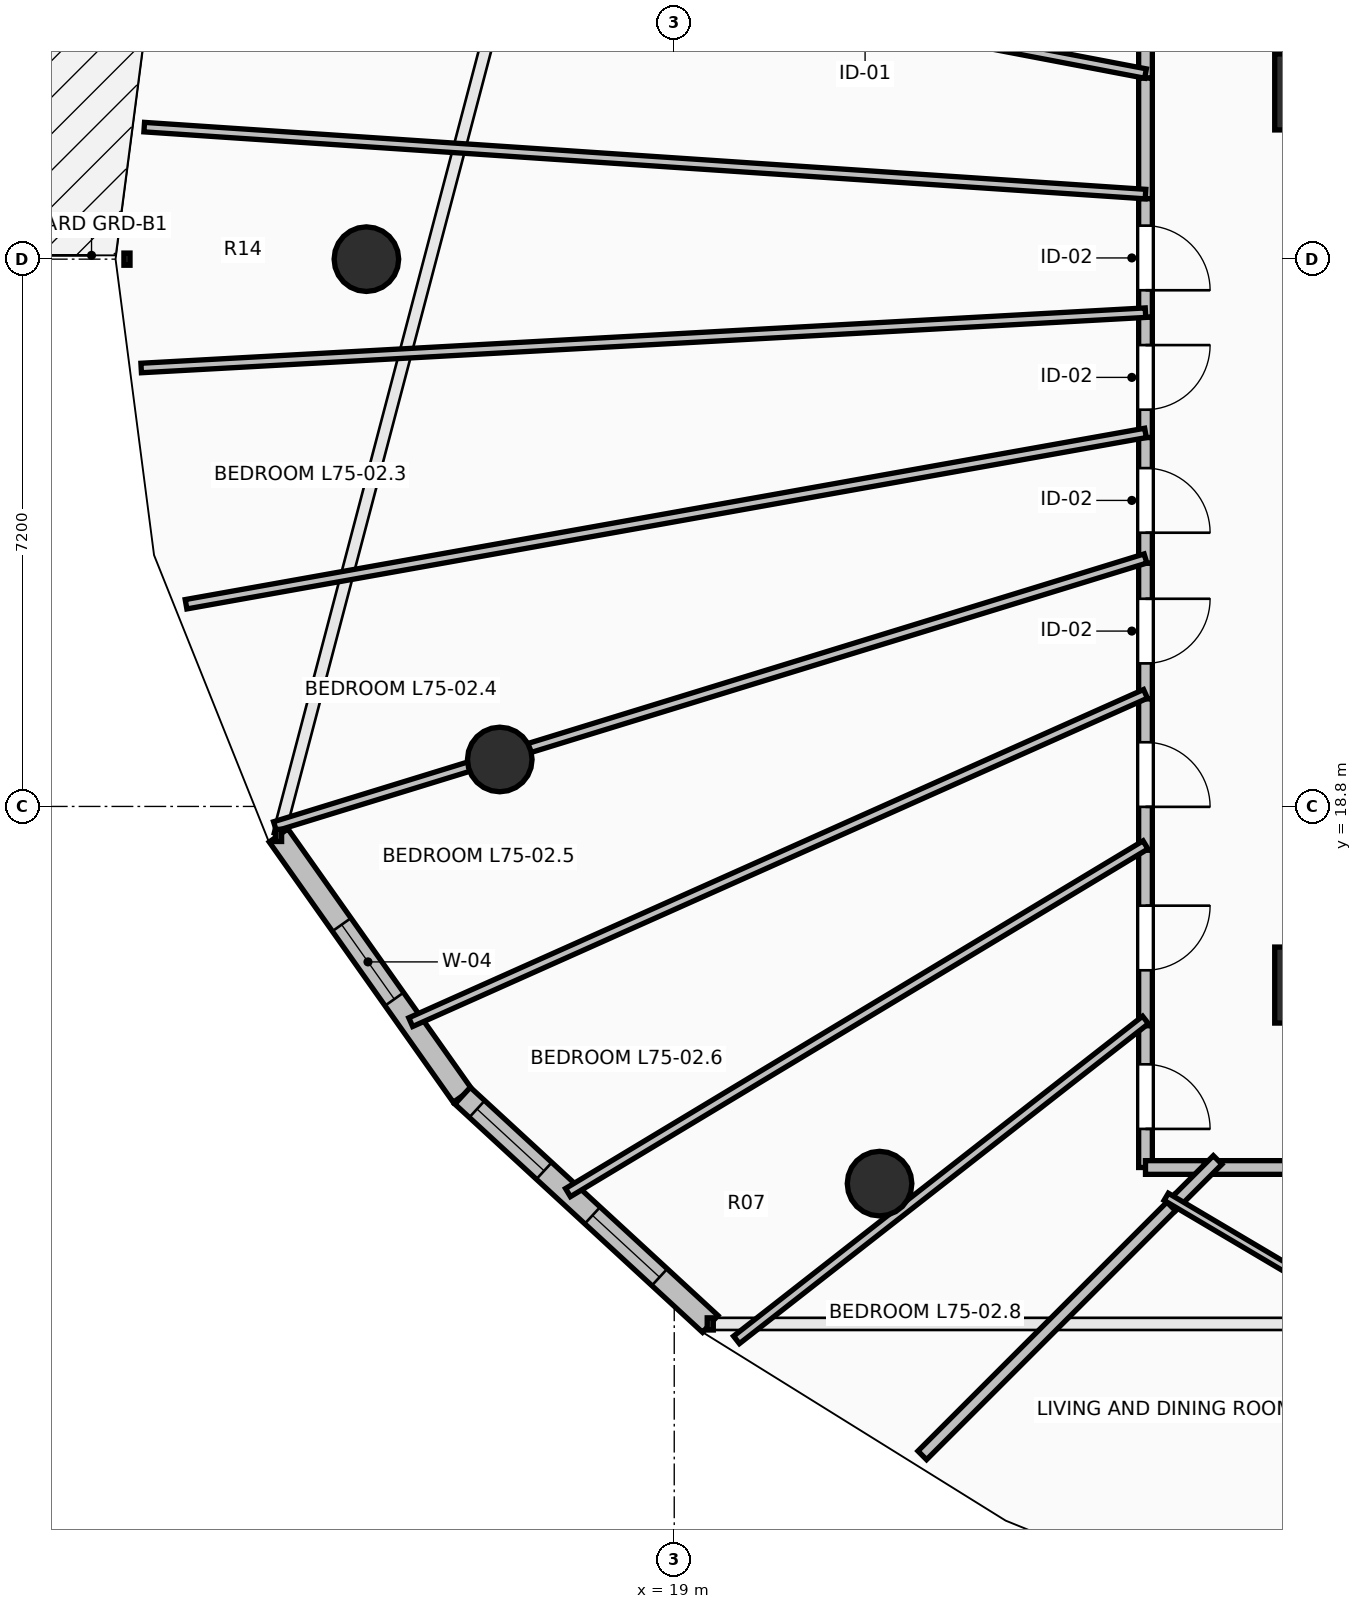
"""IFC4 building model, lengths in metres.
Left out: names, types, materials, properties, quantities, classifications, styles, units other than length and angle.
Written with IfcOpenShell. Run it as: python <this file> out.ifc"""

import sys

from ifc_helpers import new_model, si_unit, direction, frame, frame_2d, origin, origin_2d, place, context, subcontext, project, spatial, rectangle, circle, extrude, element, fill, save


model = new_model("IFC4")
c1 = context("Model", 3, precision=1e-05, world=origin(), true_north=direction((0.0, 1.0)))
c2 = subcontext(c1, "Body", "Model", "MODEL_VIEW")
j1 = project(units=[si_unit("LENGTHUNIT", "METRE"), si_unit("PLANEANGLEUNIT", "RADIAN")], contexts=[c1])
p1 = place(None, origin())
s1 = spatial("IfcSite", under=j1, at=p1, CompositionType="ELEMENT")
p2 = place(p1, origin())
s2 = spatial("IfcBuilding", under=s1, at=p2, CompositionType="ELEMENT")
p3 = place(p2, frame((0.0, 0.0, 276.85)))
s3 = spatial("IfcBuildingStorey", under=s2, at=p3, CompositionType="ELEMENT", Elevation=276.85)
for number, where, z_axis, x_axis in (
    (1, (14.95, 26.0, 0.0), (0.0, 0.0, 1.0), (-1.0, 0.0, 0.0)),
    (2, (16.705, 19.418, 0.0), (0.0, 0.0, 1.0), (-0.924, -0.383, 0.0)),
    (3, (21.701, 13.838, 0.0), (0.0, 0.0, 1.0), (-0.707, -0.707, 0.0)),
):
    element("IfcColumn", number, at=place(p3, frame(where, z_axis=z_axis, x_axis=x_axis)), inside=s3, PredefinedType="COLUMN", context=c2, shape_type="SweptSolid", body=[
        extrude(circle(Radius=0.425, at=origin_2d()), origin(), (0.0, 0.0, 1.0), 3.55),
    ])
for number, where, z_axis, x_axis in (
    (4, (27.25, 16.45, 0.0), (0.0, 0.0, 1.0), (1.0, 0.0, 0.0)),
    (5, (27.25, 28.2, 0.0), (0.0, 0.0, 1.0), (1.0, 0.0, 0.0)),
):
    element("IfcColumn", number, at=place(p3, frame(where, z_axis=z_axis, x_axis=x_axis)), inside=s3, PredefinedType="PILASTER", context=c2, shape_type="SweptSolid", body=[
        extrude(rectangle(XDim=0.7, YDim=1.0, at=origin_2d()), origin(), (0.0, 0.0, 1.0), 3.55),
    ])
p4 = place(p3, frame((13.794, 18.419, 0.0), z_axis=(0.0, 0.0, 1.0), x_axis=(0.577261247247, -0.816559521668, 0.0)))
e6 = element("IfcWall", 6, at=p4, inside=s3, PredefinedType="STANDARD", context=c2, shape_type="SweptSolid", body=[
    extrude(rectangle(XDim=4.194, YDim=0.3, at=frame_2d((2.097, 0.0))), origin(), (0.0, 0.0, 1.0), 3.19),
])
p5 = place(p4, frame((1.438, 0.0, 0.85)))
e7 = element("IfcOpeningElement", 7, at=p5, cuts=e6, PredefinedType="OPENING", context=c2, shape_type="SweptSolid", body=[
    extrude(rectangle(XDim=1.2, YDim=1.95, at=frame_2d((0.6, 0.975))), frame((0.0, 0.165, 0.0), z_axis=(0.0, -1.0, 0.0), x_axis=(1.0, 0.0, 0.0)), (0.0, 0.0, 1.0), 0.33),
])
p6 = place(p3, frame((16.216, 14.994, 0.0), z_axis=(0.0, 0.0, 1.0), x_axis=(0.735445373611, -0.677584018727, 0.0)))
e8 = element("IfcWall", 8, at=p6, inside=s3, PredefinedType="STANDARD", context=c2, shape_type="SweptSolid", body=[
    extrude(rectangle(XDim=4.43, YDim=0.3, at=frame_2d((2.215, 0.0))), origin(), (0.0, 0.0, 1.0), 3.19),
])
p7 = place(p6, frame((0.258, 0.0, 0.85)))
e9 = element("IfcOpeningElement", 9, at=p7, cuts=e8, PredefinedType="OPENING", context=c2, shape_type="SweptSolid", body=[
    extrude(rectangle(XDim=1.2, YDim=1.95, at=frame_2d((0.6, 0.975))), frame((0.0, 0.165, 0.0), z_axis=(0.0, -1.0, 0.0), x_axis=(1.0, 0.0, 0.0)), (0.0, 0.0, 1.0), 0.33),
])
p8 = place(p6, frame((2.323, 0.0, 0.85)))
e10 = element("IfcOpeningElement", 10, at=p8, cuts=e8, PredefinedType="OPENING", context=c2, shape_type="SweptSolid", body=[
    extrude(rectangle(XDim=1.2, YDim=1.95, at=frame_2d((0.6, 0.975))), frame((0.0, 0.165, 0.0), z_axis=(0.0, -1.0, 0.0), x_axis=(1.0, 0.0, 0.0)), (0.0, 0.0, 1.0), 0.33),
])
p9 = place(p3, frame((25.2, 33.445, 0.0), z_axis=(0.0, 0.0, 1.0), x_axis=(0.0, -1.0, 0.0)))
e11 = element("IfcWall", 11, at=p9, inside=s3, PredefinedType="PARTITIONING", context=c2, shape_type="SweptSolid", body=[
    extrude(rectangle(XDim=5.063, YDim=0.18, at=frame_2d((2.531, 0.0))), origin(), (0.0, 0.0, 1.0), 2.382),
])
p10 = place(p9, frame((2.031, 0.0, 0.0)))
e12 = element("IfcOpeningElement", 12, at=p10, cuts=e11, PredefinedType="OPENING", context=c2, shape_type="SweptSolid", body=[
    extrude(rectangle(XDim=1.0, YDim=2.15, at=frame_2d((0.5, 1.075))), frame((0.0, 0.105, 0.0), z_axis=(0.0, -1.0, 0.0), x_axis=(1.0, 0.0, 0.0)), (0.0, 0.0, 1.0), 0.21),
])
p11 = place(p3, frame((25.2, 28.382, 0.0), z_axis=(0.0, 0.0, 1.0), x_axis=(0.0, -1.0, 0.0)))
e13 = element("IfcWall", 13, at=p11, inside=s3, PredefinedType="PARTITIONING", context=c2, shape_type="SweptSolid", body=[
    extrude(rectangle(XDim=1.586, YDim=0.18, at=frame_2d((0.793, 0.0))), origin(), (0.0, 0.0, 1.0), 2.382),
])
p12 = place(p3, frame((25.2, 26.796, 0.0), z_axis=(0.0, 0.0, 1.0), x_axis=(0.0, -1.0, 0.0)))
e14 = element("IfcWall", 14, at=p12, inside=s3, PredefinedType="PARTITIONING", context=c2, shape_type="SweptSolid", body=[
    extrude(rectangle(XDim=1.56, YDim=0.18, at=frame_2d((0.78, 0.0))), origin(), (0.0, 0.0, 1.0), 3.19),
])
p13 = place(p12, frame((0.355, 0.0, 0.0)))
e15 = element("IfcOpeningElement", 15, at=p13, cuts=e14, PredefinedType="OPENING", context=c2, shape_type="SweptSolid", body=[
    extrude(rectangle(XDim=0.85, YDim=2.1, at=frame_2d((0.425, 1.05))), frame((0.0, 0.105, 0.0), z_axis=(0.0, -1.0, 0.0), x_axis=(1.0, 0.0, 0.0)), (0.0, 0.0, 1.0), 0.21),
])
p14 = place(p3, frame((25.2, 25.236, 0.0), z_axis=(0.0, 0.0, 1.0), x_axis=(0.0, -1.0, 0.0)))
e16 = element("IfcWall", 16, at=p14, inside=s3, PredefinedType="PARTITIONING", context=c2, shape_type="SweptSolid", body=[
    extrude(rectangle(XDim=1.583, YDim=0.18, at=frame_2d((0.792, 0.0))), origin(), (0.0, 0.0, 1.0), 3.19),
])
p15 = place(p14, frame((0.366, 0.0, 0.0)))
e17 = element("IfcOpeningElement", 17, at=p15, cuts=e16, PredefinedType="OPENING", context=c2, shape_type="SweptSolid", body=[
    extrude(rectangle(XDim=0.85, YDim=2.1, at=frame_2d((0.425, 1.05))), frame((0.0, 0.105, 0.0), z_axis=(0.0, -1.0, 0.0), x_axis=(1.0, 0.0, 0.0)), (0.0, 0.0, 1.0), 0.21),
])
p16 = place(p3, frame((25.2, 23.653, 0.0), z_axis=(0.0, 0.0, 1.0), x_axis=(0.0, -1.0, 0.0)))
e18 = element("IfcWall", 18, at=p16, inside=s3, PredefinedType="PARTITIONING", context=c2, shape_type="SweptSolid", body=[
    extrude(rectangle(XDim=1.654, YDim=0.18, at=frame_2d((0.827, 0.0))), origin(), (0.0, 0.0, 1.0), 3.19),
])
p17 = place(p16, frame((0.402, 0.0, 0.0)))
e19 = element("IfcOpeningElement", 19, at=p17, cuts=e18, PredefinedType="OPENING", context=c2, shape_type="SweptSolid", body=[
    extrude(rectangle(XDim=0.85, YDim=2.1, at=frame_2d((0.425, 1.05))), frame((0.0, 0.105, 0.0), z_axis=(0.0, -1.0, 0.0), x_axis=(1.0, 0.0, 0.0)), (0.0, 0.0, 1.0), 0.21),
])
p18 = place(p3, frame((25.2, 21.999, 0.0), z_axis=(0.0, 0.0, 1.0), x_axis=(0.0, -1.0, 0.0)))
e20 = element("IfcWall", 20, at=p18, inside=s3, PredefinedType="PARTITIONING", context=c2, shape_type="SweptSolid", body=[
    extrude(rectangle(XDim=1.784, YDim=0.18, at=frame_2d((0.892, 0.0))), origin(), (0.0, 0.0, 1.0), 3.19),
])
p19 = place(p18, frame((0.467, 0.0, 0.0)))
e21 = element("IfcOpeningElement", 21, at=p19, cuts=e20, PredefinedType="OPENING", context=c2, shape_type="SweptSolid", body=[
    extrude(rectangle(XDim=0.85, YDim=2.1, at=frame_2d((0.425, 1.05))), frame((0.0, 0.105, 0.0), z_axis=(0.0, -1.0, 0.0), x_axis=(1.0, 0.0, 0.0)), (0.0, 0.0, 1.0), 0.21),
])
p20 = place(p3, frame((25.2, 20.215, 0.0), z_axis=(0.0, 0.0, 1.0), x_axis=(0.0, -1.0, 0.0)))
e22 = element("IfcWall", 22, at=p20, inside=s3, PredefinedType="PARTITIONING", context=c2, shape_type="SweptSolid", body=[
    extrude(rectangle(XDim=1.991, YDim=0.18, at=frame_2d((0.996, 0.0))), origin(), (0.0, 0.0, 1.0), 3.19),
])
p21 = place(p20, frame((0.571, 0.0, 0.0)))
e23 = element("IfcOpeningElement", 23, at=p21, cuts=e22, PredefinedType="OPENING", context=c2, shape_type="SweptSolid", body=[
    extrude(rectangle(XDim=0.85, YDim=2.1, at=frame_2d((0.425, 1.05))), frame((0.0, 0.105, 0.0), z_axis=(0.0, -1.0, 0.0), x_axis=(1.0, 0.0, 0.0)), (0.0, 0.0, 1.0), 0.21),
])
p22 = place(p3, frame((25.2, 18.224, 0.0), z_axis=(0.0, 0.0, 1.0), x_axis=(0.0, -1.0, 0.0)))
e24 = element("IfcWall", 24, at=p22, inside=s3, PredefinedType="PARTITIONING", context=c2, shape_type="SweptSolid", body=[
    extrude(rectangle(XDim=2.309, YDim=0.18, at=frame_2d((1.155, 0.0))), origin(), (0.0, 0.0, 1.0), 2.382),
])
p23 = place(p22, frame((0.729, 0.0, 0.0)))
e25 = element("IfcOpeningElement", 25, at=p23, cuts=e24, PredefinedType="OPENING", context=c2, shape_type="SweptSolid", body=[
    extrude(rectangle(XDim=0.85, YDim=2.1, at=frame_2d((0.425, 1.05))), frame((0.0, 0.105, 0.0), z_axis=(0.0, -1.0, 0.0), x_axis=(1.0, 0.0, 0.0)), (0.0, 0.0, 1.0), 0.21),
])
p24 = place(p3, frame((25.2, 15.915, 0.0), z_axis=(0.0, 0.0, 1.0), x_axis=(0.0, -1.0, 0.0)))
e26 = element("IfcWall", 26, at=p24, inside=s3, PredefinedType="PARTITIONING", context=c2, shape_type="SweptSolid", body=[
    extrude(rectangle(XDim=1.865, YDim=0.18, at=frame_2d((0.933, 0.0))), origin(), (0.0, 0.0, 1.0), 2.382),
])
p25 = place(p24, frame((0.508, 0.0, 0.0)))
e27 = element("IfcOpeningElement", 27, at=p25, cuts=e26, PredefinedType="OPENING", context=c2, shape_type="SweptSolid", body=[
    extrude(rectangle(XDim=0.85, YDim=2.1, at=frame_2d((0.425, 1.05))), frame((0.0, 0.105, 0.0), z_axis=(0.0, -1.0, 0.0), x_axis=(1.0, 0.0, 0.0)), (0.0, 0.0, 1.0), 0.21),
])
p26 = place(p3, frame((25.2, 14.05, 0.0), z_axis=(0.0, 0.0, 1.0), x_axis=(1.0, 0.0, 0.0)))
e28 = element("IfcWall", 28, at=p26, inside=s3, PredefinedType="PARTITIONING", context=c2, shape_type="SweptSolid", body=[
    extrude(rectangle(XDim=0.91, YDim=0.18, at=frame_2d((0.455, 0.0))), origin(), (0.0, 0.0, 1.0), 3.19),
])
p27 = place(p3, frame((25.97, 14.05, 0.0), z_axis=(0.0, 0.0, 1.0), x_axis=(1.0, 0.0, 0.0)))
e29 = element("IfcWall", 29, at=p27, inside=s3, PredefinedType="PARTITIONING", context=c2, shape_type="SweptSolid", body=[
    extrude(rectangle(XDim=5.215, YDim=0.18, at=frame_2d((2.607, 0.0))), origin(), (0.0, 0.0, 1.0), 2.382),
])
p28 = place(p3, frame((17.889, 29.837, 0.0), z_axis=(0.0, 0.0, 1.0), x_axis=(0.982284262094, -0.187396980877, 0.0)))
e30 = element("IfcWall", 30, at=p28, inside=s3, PredefinedType="PARTITIONING", context=c2, shape_type="SweptSolid", body=[
    extrude(rectangle(XDim=7.443, YDim=0.125, at=frame_2d((3.721, 0.0))), origin(), (0.0, 0.0, 1.0), 3.19),
])
p29 = place(p28, frame((3.271, 0.0, 0.0)))
e31 = element("IfcOpeningElement", 31, at=p29, cuts=e30, PredefinedType="OPENING", context=c2, shape_type="SweptSolid", body=[
    extrude(rectangle(XDim=0.9, YDim=2.1, at=frame_2d((0.45, 1.05))), frame((0.0, 0.077, 0.0), z_axis=(0.0, -1.0, 0.0), x_axis=(1.0, 0.0, 0.0)), (0.0, 0.0, 1.0), 0.155),
])
p30 = place(p3, frame((12.027, 27.737, 0.0), z_axis=(0.0, 0.0, 1.0), x_axis=(0.997770487114, -0.066738707243, 0.0)))
e32 = element("IfcWall", 32, at=p30, inside=s3, PredefinedType="PARTITIONING", context=c2, shape_type="SweptSolid", body=[
    extrude(rectangle(XDim=13.202, YDim=0.125, at=frame_2d((6.601, 0.0))), origin(), (0.0, 0.0, 1.0), 2.382),
])
p31 = place(p3, frame((11.987, 24.568, 0.0), z_axis=(0.0, 0.0, 1.0), x_axis=(0.998486468265, 0.054997933516, 0.0)))
e33 = element("IfcWall", 33, at=p31, inside=s3, PredefinedType="PARTITIONING", context=c2, shape_type="SweptSolid", body=[
    extrude(rectangle(XDim=13.233, YDim=0.125, at=frame_2d((6.616, 0.0))), origin(), (0.0, 0.0, 1.0), 2.774),
])
p32 = place(p3, frame((12.577, 21.46, 0.0), z_axis=(0.0, 0.0, 1.0), x_axis=(0.984427104809, 0.175793274383, 0.0)))
e34 = element("IfcWall", 34, at=p32, inside=s3, PredefinedType="PARTITIONING", context=c2, shape_type="SweptSolid", body=[
    extrude(rectangle(XDim=12.823, YDim=0.125, at=frame_2d((6.411, 0.0))), origin(), (0.0, 0.0, 1.0), 2.774),
])
p33 = place(p3, frame((13.747, 18.539, 0.0), z_axis=(0.0, 0.0, 1.0), x_axis=(0.955802794564, 0.294008533725, 0.0)))
e35 = element("IfcWall", 35, at=p33, inside=s3, PredefinedType="PARTITIONING", context=c2, shape_type="SweptSolid", body=[
    extrude(rectangle(XDim=11.982, YDim=0.125, at=frame_2d((5.991, 0.0))), origin(), (0.0, 0.0, 1.0), 2.382),
])
p34 = place(p3, frame((15.533, 15.962, 0.0), z_axis=(0.0, 0.0, 1.0), x_axis=(0.913015836792, 0.407924112756, 0.0)))
e36 = element("IfcWall", 36, at=p34, inside=s3, PredefinedType="PARTITIONING", context=c2, shape_type="SweptSolid", body=[
    extrude(rectangle(XDim=10.588, YDim=0.125, at=frame_2d((5.294, 0.0))), origin(), (0.0, 0.0, 1.0), 2.382),
])
p35 = place(p3, frame((17.602, 13.72, 0.0), z_axis=(0.0, 0.0, 1.0), x_axis=(0.856734134601, 0.515758298633, 0.0)))
e37 = element("IfcWall", 37, at=p35, inside=s3, PredefinedType="PARTITIONING", context=c2, shape_type="SweptSolid", body=[
    extrude(rectangle(XDim=8.868, YDim=0.125, at=frame_2d((4.434, 0.0))), origin(), (0.0, 0.0, 1.0), 2.382),
])
p36 = place(p3, frame((19.819, 11.782, 0.0), z_axis=(0.0, 0.0, 1.0), x_axis=(0.78765580417, 0.61611552014, 0.0)))
e38 = element("IfcWall", 38, at=p36, inside=s3, PredefinedType="PARTITIONING", context=c2, shape_type="SweptSolid", body=[
    extrude(rectangle(XDim=6.832, YDim=0.125, at=frame_2d((3.416, 0.0))), origin(), (0.0, 0.0, 1.0), 2.382),
])
p37 = place(p3, frame((22.263, 10.263, 0.0), z_axis=(0.0, 0.0, 1.0), x_axis=(0.707106781187, 0.707106781187, 0.0)))
e39 = element("IfcWall", 39, at=p37, inside=s3, PredefinedType="PARTITIONING", context=c2, shape_type="SweptSolid", body=[
    extrude(rectangle(XDim=4.771, YDim=0.16, at=frame_2d((2.386, 0.0))), origin(), (0.0, 0.0, 1.0), 2.774),
])
p38 = place(p3, frame((25.538, 13.538, 0.0), z_axis=(0.0, 0.0, 1.0), x_axis=(0.707106781187, 0.707106781187, 0.0)))
e40 = element("IfcWall", 40, at=p38, inside=s3, PredefinedType="PARTITIONING", context=c2, shape_type="SweptSolid", body=[
    extrude(rectangle(XDim=0.864, YDim=0.16, at=frame_2d((0.432, 0.0))), origin(), (0.0, 0.0, 1.0), 3.19),
])
p39 = place(p3, frame((27.611, 12.399, 0.0), z_axis=(0.0, 0.0, 1.0), x_axis=(-0.860546797705, 0.509371386082, 0.0)))
e41 = element("IfcWall", 41, at=p39, inside=s3, PredefinedType="PARTITIONING", context=c2, shape_type="SweptSolid", body=[
    extrude(rectangle(XDim=2.485, YDim=0.11, at=frame_2d((1.242, 0.0))), origin(), (0.0, 0.0, 1.0), 3.19),
])
p40 = place(p5, origin())
e42 = element("IfcWindow", 42, at=p40, inside=s3, PartitioningType="SINGLE_PANEL", PredefinedType="WINDOW", context=c2, shape_type="SweptSolid", body=[
    extrude(rectangle(XDim=1.2, YDim=1.95, at=frame_2d((0.6, 0.975))), frame((0.0, 0.03, 0.0), z_axis=(0.0, -1.0, 0.0), x_axis=(1.0, 0.0, 0.0)), (0.0, 0.0, 1.0), 0.06),
])
fill(e7, e42)
p41 = place(p7, origin())
e43 = element("IfcWindow", 43, at=p41, inside=s3, PartitioningType="SINGLE_PANEL", PredefinedType="WINDOW", context=c2, shape_type="SweptSolid", body=[
    extrude(rectangle(XDim=1.2, YDim=1.95, at=frame_2d((0.6, 0.975))), frame((0.0, 0.03, 0.0), z_axis=(0.0, -1.0, 0.0), x_axis=(1.0, 0.0, 0.0)), (0.0, 0.0, 1.0), 0.06),
])
fill(e9, e43)
p42 = place(p8, origin())
e44 = element("IfcWindow", 44, at=p42, inside=s3, PartitioningType="SINGLE_PANEL", PredefinedType="WINDOW", context=c2, shape_type="SweptSolid", body=[
    extrude(rectangle(XDim=1.2, YDim=1.95, at=frame_2d((0.6, 0.975))), frame((0.0, 0.03, 0.0), z_axis=(0.0, -1.0, 0.0), x_axis=(1.0, 0.0, 0.0)), (0.0, 0.0, 1.0), 0.06),
])
fill(e10, e44)
p43 = place(p13, origin())
e45 = element("IfcDoor", 45, at=p43, inside=s3, OperationType="SINGLE_SWING_RIGHT", PredefinedType="DOOR", context=c2, shape_type="SweptSolid", body=[
    extrude(rectangle(XDim=0.85, YDim=2.1, at=frame_2d((0.425, 1.05))), frame((0.0, 0.025, 0.0), z_axis=(0.0, -1.0, 0.0), x_axis=(1.0, 0.0, 0.0)), (0.0, 0.0, 1.0), 0.05),
])
fill(e15, e45)
p44 = place(p15, origin())
e46 = element("IfcDoor", 46, at=p44, inside=s3, OperationType="SINGLE_SWING_LEFT", PredefinedType="DOOR", context=c2, shape_type="SweptSolid", body=[
    extrude(rectangle(XDim=0.85, YDim=2.1, at=frame_2d((0.425, 1.05))), frame((0.0, 0.025, 0.0), z_axis=(0.0, -1.0, 0.0), x_axis=(1.0, 0.0, 0.0)), (0.0, 0.0, 1.0), 0.05),
])
fill(e17, e46)
p45 = place(p17, origin())
e47 = element("IfcDoor", 47, at=p45, inside=s3, OperationType="SINGLE_SWING_RIGHT", PredefinedType="DOOR", context=c2, shape_type="SweptSolid", body=[
    extrude(rectangle(XDim=0.85, YDim=2.1, at=frame_2d((0.425, 1.05))), frame((0.0, 0.025, 0.0), z_axis=(0.0, -1.0, 0.0), x_axis=(1.0, 0.0, 0.0)), (0.0, 0.0, 1.0), 0.05),
])
fill(e19, e47)
p46 = place(p19, origin())
e48 = element("IfcDoor", 48, at=p46, inside=s3, OperationType="SINGLE_SWING_LEFT", PredefinedType="DOOR", context=c2, shape_type="SweptSolid", body=[
    extrude(rectangle(XDim=0.85, YDim=2.1, at=frame_2d((0.425, 1.05))), frame((0.0, 0.025, 0.0), z_axis=(0.0, -1.0, 0.0), x_axis=(1.0, 0.0, 0.0)), (0.0, 0.0, 1.0), 0.05),
])
fill(e21, e48)
p47 = place(p21, origin())
e49 = element("IfcDoor", 49, at=p47, inside=s3, OperationType="SINGLE_SWING_RIGHT", PredefinedType="DOOR", context=c2, shape_type="SweptSolid", body=[
    extrude(rectangle(XDim=0.85, YDim=2.1, at=frame_2d((0.425, 1.05))), frame((0.0, 0.025, 0.0), z_axis=(0.0, -1.0, 0.0), x_axis=(1.0, 0.0, 0.0)), (0.0, 0.0, 1.0), 0.05),
])
fill(e23, e49)
p48 = place(p23, origin())
e50 = element("IfcDoor", 50, at=p48, inside=s3, OperationType="SINGLE_SWING_LEFT", PredefinedType="DOOR", context=c2, shape_type="SweptSolid", body=[
    extrude(rectangle(XDim=0.85, YDim=2.1, at=frame_2d((0.425, 1.05))), frame((0.0, 0.025, 0.0), z_axis=(0.0, -1.0, 0.0), x_axis=(1.0, 0.0, 0.0)), (0.0, 0.0, 1.0), 0.05),
])
fill(e25, e50)
p49 = place(p25, origin())
e51 = element("IfcDoor", 51, at=p49, inside=s3, OperationType="SINGLE_SWING_RIGHT", PredefinedType="DOOR", context=c2, shape_type="SweptSolid", body=[
    extrude(rectangle(XDim=0.85, YDim=2.1, at=frame_2d((0.425, 1.05))), frame((0.0, 0.025, 0.0), z_axis=(0.0, -1.0, 0.0), x_axis=(1.0, 0.0, 0.0)), (0.0, 0.0, 1.0), 0.05),
])
fill(e27, e51)
save(model, sys.argv[1])
